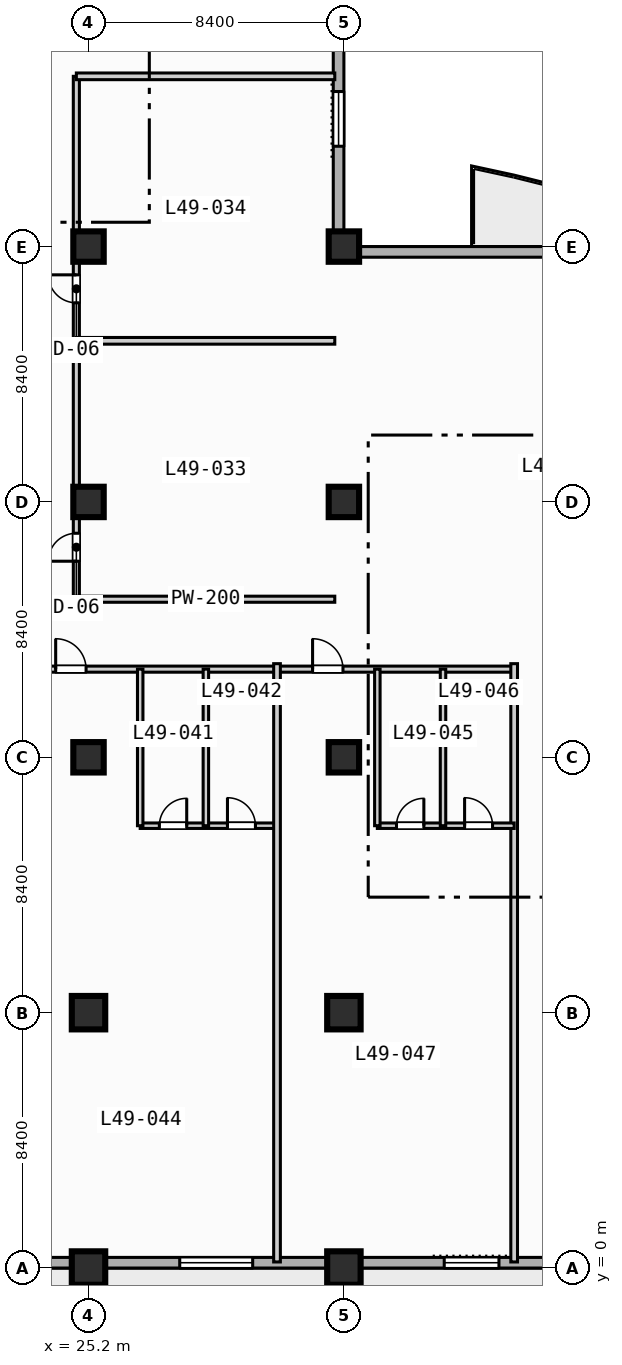
"""IFC4 building model, lengths in metres.
Left out: names, types, materials, properties, quantities, classifications, styles, units other than length and angle.
Written with IfcOpenShell. Run it as: python <this file> out.ifc"""

import sys

from ifc_helpers import new_model, si_unit, direction, frame, frame_2d, origin, origin_2d, place, context, subcontext, project, spatial, rectangle, extrude, element, fill, save


model = new_model("IFC4")
c1 = context("Model", 3, precision=1e-05, world=origin(), true_north=direction((0.0, 1.0)))
c2 = subcontext(c1, "Body", "Model", "MODEL_VIEW")
j1 = project(units=[si_unit("LENGTHUNIT", "METRE"), si_unit("PLANEANGLEUNIT", "RADIAN")], contexts=[c1])
p1 = place(None, origin())
s1 = spatial("IfcSite", under=j1, at=p1, CompositionType="ELEMENT")
p2 = place(p1, origin())
s2 = spatial("IfcBuilding", under=s1, at=p2, CompositionType="ELEMENT")
p3 = place(p2, frame((0.0, 0.0, 201.3)))
s3 = spatial("IfcBuildingStorey", under=s2, at=p3, CompositionType="ELEMENT", Elevation=201.3)
for number, where, z_axis, x_axis in (
    (1, (25.2, 0.0, 0.0), (0.0, 0.0, 1.0), (1.0, 0.0, 0.0)),
    (2, (25.2, 8.4, 0.0), (0.0, 0.0, 1.0), (1.0, 0.0, 0.0)),
):
    element("IfcColumn", number, at=place(p3, frame(where, z_axis=z_axis, x_axis=x_axis)), inside=s3, PredefinedType="COLUMN", context=c2, shape_type="SweptSolid", body=[
        extrude(rectangle(XDim=1.1, YDim=1.1, at=origin_2d()), origin(), (0.0, 0.0, 1.0), 3.7),
    ])
for number, where, z_axis, x_axis in (
    (3, (25.2, 16.8, 0.0), (0.0, 0.0, 1.0), (1.0, 0.0, 0.0)),
    (4, (25.2, 25.2, 0.0), (0.0, 0.0, 1.0), (1.0, 0.0, 0.0)),
    (5, (25.2, 33.6, 0.0), (0.0, 0.0, 1.0), (1.0, 0.0, 0.0)),
):
    element("IfcColumn", number, at=place(p3, frame(where, z_axis=z_axis, x_axis=x_axis)), inside=s3, PredefinedType="COLUMN", context=c2, shape_type="SweptSolid", body=[
        extrude(rectangle(XDim=1.0, YDim=1.0, at=origin_2d()), origin(), (0.0, 0.0, 1.0), 3.7),
    ])
for number, where, z_axis, x_axis in (
    (6, (33.6, 0.0, 0.0), (0.0, 0.0, 1.0), (1.0, 0.0, 0.0)),
    (7, (33.6, 8.4, 0.0), (0.0, 0.0, 1.0), (1.0, 0.0, 0.0)),
):
    element("IfcColumn", number, at=place(p3, frame(where, z_axis=z_axis, x_axis=x_axis)), inside=s3, PredefinedType="COLUMN", context=c2, shape_type="SweptSolid", body=[
        extrude(rectangle(XDim=1.1, YDim=1.1, at=origin_2d()), origin(), (0.0, 0.0, 1.0), 3.7),
    ])
for number, where, z_axis, x_axis in (
    (8, (33.6, 16.8, 0.0), (0.0, 0.0, 1.0), (1.0, 0.0, 0.0)),
    (9, (33.6, 25.2, 0.0), (0.0, 0.0, 1.0), (1.0, 0.0, 0.0)),
    (10, (33.6, 33.6, 0.0), (0.0, 0.0, 1.0), (1.0, 0.0, 0.0)),
):
    element("IfcColumn", number, at=place(p3, frame(where, z_axis=z_axis, x_axis=x_axis)), inside=s3, PredefinedType="COLUMN", context=c2, shape_type="SweptSolid", body=[
        extrude(rectangle(XDim=1.0, YDim=1.0, at=origin_2d()), origin(), (0.0, 0.0, 1.0), 3.7),
    ])
p4 = place(p3, frame((33.425, 72.425, 0.0), z_axis=(0.0, 0.0, 1.0), x_axis=(0.0, -1.0, 0.0)))
e11 = element("IfcWall", 11, at=p4, inside=s3, PredefinedType="STANDARD", context=c2, shape_type="SweptSolid", body=[
    extrude(rectangle(XDim=39.0, YDim=0.35, at=frame_2d((19.5, 0.0))), origin(), (0.0, 0.0, 1.0), 3.47),
])
p5 = place(p4, frame((33.725, 0.0, 0.85)))
e12 = element("IfcOpeningElement", 12, at=p5, cuts=e11, PredefinedType="OPENING", context=c2, shape_type="SweptSolid", body=[
    extrude(rectangle(XDim=1.8, YDim=1.8, at=frame_2d((0.9, 0.9))), frame((0.0, 0.185, 0.0), z_axis=(0.0, -1.0, 0.0), x_axis=(1.0, 0.0, 0.0)), (0.0, 0.0, 1.0), 0.37),
])
p6 = place(p4, frame((16.925, 0.0, 0.85)))
e13 = element("IfcOpeningElement", 13, at=p6, cuts=e11, PredefinedType="OPENING", context=c2, shape_type="SweptSolid", body=[
    extrude(rectangle(XDim=1.8, YDim=1.8, at=frame_2d((0.9, 0.9))), frame((0.0, 0.185, 0.0), z_axis=(0.0, -1.0, 0.0), x_axis=(1.0, 0.0, 0.0)), (0.0, 0.0, 1.0), 0.37),
])
p7 = place(p4, frame((8.225, 0.0, 0.85)))
e14 = element("IfcOpeningElement", 14, at=p7, cuts=e11, PredefinedType="OPENING", context=c2, shape_type="SweptSolid", body=[
    extrude(rectangle(XDim=2.4, YDim=1.95, at=frame_2d((1.2, 0.975))), frame((0.0, 0.185, 0.0), z_axis=(0.0, -1.0, 0.0), x_axis=(1.0, 0.0, 0.0)), (0.0, 0.0, 1.0), 0.37),
])
p8 = place(p3, frame((33.425, 33.425, 0.0), z_axis=(0.0, 0.0, 1.0), x_axis=(1.0, 0.0, 0.0)))
e15 = element("IfcWall", 15, at=p8, inside=s3, PredefinedType="STANDARD", context=c2, shape_type="SweptSolid", body=[
    extrude(rectangle(XDim=39.0, YDim=0.35, at=frame_2d((19.5, 0.0))), origin(), (0.0, 0.0, 1.0), 3.47),
])
p9 = place(p8, frame((12.075, 0.0, 0.0)))
e16 = element("IfcOpeningElement", 16, at=p9, cuts=e15, PredefinedType="OPENING", context=c2, shape_type="SweptSolid", body=[
    extrude(rectangle(XDim=1.4, YDim=2.2, at=frame_2d((0.7, 1.1))), frame((0.0, 0.185, 0.0), z_axis=(0.0, -1.0, 0.0), x_axis=(1.0, 0.0, 0.0)), (0.0, 0.0, 1.0), 0.37),
])
p10 = place(p3, frame((72.425, 0.175, 0.0), z_axis=(0.0, 0.0, 1.0), x_axis=(-1.0, 0.0, 0.0)))
e17 = element("IfcWall", 17, at=p10, inside=s3, PredefinedType="STANDARD", context=c2, shape_type="SweptSolid", body=[
    extrude(rectangle(XDim=69.25, YDim=0.35, at=frame_2d((34.625, 0.0))), origin(), (0.0, 0.0, 1.0), 3.47),
])
p11 = place(p10, frame((52.825, 0.0, 0.0)))
e18 = element("IfcOpeningElement", 18, at=p11, cuts=e17, PredefinedType="OPENING", context=c2, shape_type="SweptSolid", body=[
    extrude(rectangle(XDim=1.4, YDim=2.2, at=frame_2d((0.7, 1.1))), frame((0.0, 0.185, 0.0), z_axis=(0.0, -1.0, 0.0), x_axis=(1.0, 0.0, 0.0)), (0.0, 0.0, 1.0), 0.37),
])
p12 = place(p10, frame((41.825, 0.0, 0.85)))
e19 = element("IfcOpeningElement", 19, at=p12, cuts=e17, PredefinedType="OPENING", context=c2, shape_type="SweptSolid", body=[
    extrude(rectangle(XDim=2.4, YDim=1.95, at=frame_2d((1.2, 0.975))), frame((0.0, 0.185, 0.0), z_axis=(0.0, -1.0, 0.0), x_axis=(1.0, 0.0, 0.0)), (0.0, 0.0, 1.0), 0.37),
])
p13 = place(p10, frame((33.725, 0.0, 0.85)))
e20 = element("IfcOpeningElement", 20, at=p13, cuts=e17, PredefinedType="OPENING", context=c2, shape_type="SweptSolid", body=[
    extrude(rectangle(XDim=1.8, YDim=1.8, at=frame_2d((0.9, 0.9))), frame((0.0, 0.185, 0.0), z_axis=(0.0, -1.0, 0.0), x_axis=(1.0, 0.0, 0.0)), (0.0, 0.0, 1.0), 0.37),
])
p14 = place(p10, frame((25.025, 0.0, 0.85)))
e21 = element("IfcOpeningElement", 21, at=p14, cuts=e17, PredefinedType="OPENING", context=c2, shape_type="SweptSolid", body=[
    extrude(rectangle(XDim=2.4, YDim=1.95, at=frame_2d((1.2, 0.975))), frame((0.0, 0.185, 0.0), z_axis=(0.0, -1.0, 0.0), x_axis=(1.0, 0.0, 0.0)), (0.0, 0.0, 1.0), 0.37),
])
p15 = place(p10, frame((64.675, 0.0, 0.85)))
e22 = element("IfcOpeningElement", 22, at=p15, cuts=e17, PredefinedType="OPENING", context=c2, shape_type="SweptSolid", body=[
    extrude(rectangle(XDim=1.8, YDim=1.8, at=frame_2d((0.9, 0.9))), frame((0.0, 0.185, 0.0), z_axis=(0.0, -1.0, 0.0), x_axis=(1.0, 0.0, 0.0)), (0.0, 0.0, 1.0), 0.37),
])
p16 = place(p10, frame((50.275, 0.0, 0.85)))
e23 = element("IfcOpeningElement", 23, at=p16, cuts=e17, PredefinedType="OPENING", context=c2, shape_type="SweptSolid", body=[
    extrude(rectangle(XDim=1.8, YDim=1.8, at=frame_2d((0.9, 0.9))), frame((0.0, 0.185, 0.0), z_axis=(0.0, -1.0, 0.0), x_axis=(1.0, 0.0, 0.0)), (0.0, 0.0, 1.0), 0.37),
])
p17 = place(p3, frame((24.8, 22.0, 0.0), z_axis=(0.0, 0.0, 1.0), x_axis=(0.0, 1.0, 0.0)))
e24 = element("IfcWall", 24, at=p17, inside=s3, PredefinedType="PARTITIONING", context=c2, shape_type="SweptSolid", body=[
    extrude(rectangle(XDim=17.2, YDim=0.2, at=frame_2d((8.6, 0.0))), origin(), (0.0, 0.0, 1.0), 3.47),
])
p18 = place(p17, frame((1.25, 0.0, 0.0)))
e25 = element("IfcOpeningElement", 25, at=p18, cuts=e24, PredefinedType="OPENING", context=c2, shape_type="SweptSolid", body=[
    extrude(rectangle(XDim=0.92, YDim=2.1, at=frame_2d((0.46, 1.05))), frame((0.0, 0.11, 0.0), z_axis=(0.0, -1.0, 0.0), x_axis=(1.0, 0.0, 0.0)), (0.0, 0.0, 1.0), 0.22),
])
p19 = place(p17, frame((9.75, 0.0, 0.0)))
e26 = element("IfcOpeningElement", 26, at=p19, cuts=e24, PredefinedType="OPENING", context=c2, shape_type="SweptSolid", body=[
    extrude(rectangle(XDim=0.92, YDim=2.1, at=frame_2d((0.46, 1.05))), frame((0.0, 0.11, 0.0), z_axis=(0.0, -1.0, 0.0), x_axis=(1.0, 0.0, 0.0)), (0.0, 0.0, 1.0), 0.22),
])
p20 = place(p3, frame((24.8, 22.0, 0.0), z_axis=(0.0, 0.0, 1.0), x_axis=(1.0, 0.0, 0.0)))
e27 = element("IfcWall", 27, at=p20, inside=s3, PredefinedType="PARTITIONING", context=c2, shape_type="SweptSolid", body=[
    extrude(rectangle(XDim=8.5, YDim=0.2, at=frame_2d((4.25, 0.0))), origin(), (0.0, 0.0, 1.0), 3.47),
])
for number, where, z_axis, x_axis in (
    (28, (24.8, 30.5, 0.0), (0.0, 0.0, 1.0), (1.0, 0.0, 0.0)),
    (29, (24.8, 39.2, 0.0), (0.0, 0.0, 1.0), (1.0, 0.0, 0.0)),
):
    element("IfcWall", number, at=place(p3, frame(where, z_axis=z_axis, x_axis=x_axis)), inside=s3, PredefinedType="PARTITIONING", context=c2, shape_type="SweptSolid", body=[
        extrude(rectangle(XDim=8.5, YDim=0.22, at=frame_2d((4.25, 0.0))), origin(), (0.0, 0.0, 1.0), 3.47),
    ])
p21 = place(p3, frame((3.4, 19.7, 0.0), z_axis=(0.0, 0.0, 1.0), x_axis=(1.0, 0.0, 0.0)))
e30 = element("IfcWall", 30, at=p21, inside=s3, PredefinedType="PARTITIONING", context=c2, shape_type="SweptSolid", body=[
    extrude(rectangle(XDim=35.8, YDim=0.2, at=frame_2d((17.9, 0.0))), origin(), (0.0, 0.0, 1.0), 3.47),
])
p22 = place(p21, frame((1.47, 0.0, 0.0)))
e31 = element("IfcOpeningElement", 31, at=p22, cuts=e30, PredefinedType="OPENING", context=c2, shape_type="SweptSolid", body=[
    extrude(rectangle(XDim=1.0, YDim=2.15, at=frame_2d((0.5, 1.075))), frame((0.0, 0.11, 0.0), z_axis=(0.0, -1.0, 0.0), x_axis=(1.0, 0.0, 0.0)), (0.0, 0.0, 1.0), 0.22),
])
p23 = place(p21, frame((9.87, 0.0, 0.0)))
e32 = element("IfcOpeningElement", 32, at=p23, cuts=e30, PredefinedType="OPENING", context=c2, shape_type="SweptSolid", body=[
    extrude(rectangle(XDim=1.0, YDim=2.15, at=frame_2d((0.5, 1.075))), frame((0.0, 0.11, 0.0), z_axis=(0.0, -1.0, 0.0), x_axis=(1.0, 0.0, 0.0)), (0.0, 0.0, 1.0), 0.22),
])
p24 = place(p21, frame((20.72, 0.0, 0.0)))
e33 = element("IfcOpeningElement", 33, at=p24, cuts=e30, PredefinedType="OPENING", context=c2, shape_type="SweptSolid", body=[
    extrude(rectangle(XDim=1.0, YDim=2.15, at=frame_2d((0.5, 1.075))), frame((0.0, 0.11, 0.0), z_axis=(0.0, -1.0, 0.0), x_axis=(1.0, 0.0, 0.0)), (0.0, 0.0, 1.0), 0.22),
])
p25 = place(p21, frame((29.17, 0.0, 0.0)))
e34 = element("IfcOpeningElement", 34, at=p25, cuts=e30, PredefinedType="OPENING", context=c2, shape_type="SweptSolid", body=[
    extrude(rectangle(XDim=1.0, YDim=2.15, at=frame_2d((0.5, 1.075))), frame((0.0, 0.11, 0.0), z_axis=(0.0, -1.0, 0.0), x_axis=(1.0, 0.0, 0.0)), (0.0, 0.0, 1.0), 0.22),
])
p26 = place(p3, frame((26.9, 14.55, 0.0), z_axis=(0.0, 0.0, 1.0), x_axis=(1.0, 0.0, 0.0)))
e35 = element("IfcWall", 35, at=p26, inside=s3, PredefinedType="PLUMBINGWALL", context=c2, shape_type="SweptSolid", body=[
    extrude(rectangle(XDim=4.5, YDim=0.18, at=frame_2d((2.25, 0.0))), origin(), (0.0, 0.0, 1.0), 3.47),
])
p27 = place(p26, frame((0.63, 0.0, 0.0)))
e36 = element("IfcOpeningElement", 36, at=p27, cuts=e35, PredefinedType="OPENING", context=c2, shape_type="SweptSolid", body=[
    extrude(rectangle(XDim=0.9, YDim=2.1, at=frame_2d((0.45, 1.05))), frame((0.0, 0.1, 0.0), z_axis=(0.0, -1.0, 0.0), x_axis=(1.0, 0.0, 0.0)), (0.0, 0.0, 1.0), 0.2),
])
p28 = place(p26, frame((2.87, 0.0, 0.0)))
e37 = element("IfcOpeningElement", 37, at=p28, cuts=e35, PredefinedType="OPENING", context=c2, shape_type="SweptSolid", body=[
    extrude(rectangle(XDim=0.92, YDim=2.1, at=frame_2d((0.46, 1.05))), frame((0.0, 0.1, 0.0), z_axis=(0.0, -1.0, 0.0), x_axis=(1.0, 0.0, 0.0)), (0.0, 0.0, 1.0), 0.2),
])
for number, where, z_axis, x_axis in (
    (38, (26.9, 14.55, 0.0), (0.0, 0.0, 1.0), (0.0, 1.0, 0.0)),
    (39, (29.06, 14.55, 0.0), (0.0, 0.0, 1.0), (0.0, 1.0, 0.0)),
):
    element("IfcWall", number, at=place(p3, frame(where, z_axis=z_axis, x_axis=x_axis)), inside=s3, PredefinedType="PLUMBINGWALL", context=c2, shape_type="SweptSolid", body=[
        extrude(rectangle(XDim=5.15, YDim=0.18, at=frame_2d((2.575, 0.0))), origin(), (0.0, 0.0, 1.0), 3.47),
    ])
for number, where, z_axis, x_axis in (
    (40, (31.4, 0.2, 0.0), (0.0, 0.0, 1.0), (0.0, 1.0, 0.0)),
    (41, (39.2, 0.2, 0.0), (0.0, 0.0, 1.0), (0.0, 1.0, 0.0)),
):
    element("IfcWall", number, at=place(p3, frame(where, z_axis=z_axis, x_axis=x_axis)), inside=s3, PredefinedType="PARTITIONING", context=c2, shape_type="SweptSolid", body=[
        extrude(rectangle(XDim=19.68, YDim=0.22, at=frame_2d((9.84, 0.0))), origin(), (0.0, 0.0, 1.0), 3.47),
    ])
p29 = place(p3, frame((34.7, 14.55, 0.0), z_axis=(0.0, 0.0, 1.0), x_axis=(1.0, 0.0, 0.0)))
e42 = element("IfcWall", 42, at=p29, inside=s3, PredefinedType="PLUMBINGWALL", context=c2, shape_type="SweptSolid", body=[
    extrude(rectangle(XDim=4.5, YDim=0.18, at=frame_2d((2.25, 0.0))), origin(), (0.0, 0.0, 1.0), 3.47),
])
p30 = place(p29, frame((0.63, 0.0, 0.0)))
e43 = element("IfcOpeningElement", 43, at=p30, cuts=e42, PredefinedType="OPENING", context=c2, shape_type="SweptSolid", body=[
    extrude(rectangle(XDim=0.9, YDim=2.1, at=frame_2d((0.45, 1.05))), frame((0.0, 0.1, 0.0), z_axis=(0.0, -1.0, 0.0), x_axis=(1.0, 0.0, 0.0)), (0.0, 0.0, 1.0), 0.2),
])
p31 = place(p29, frame((2.87, 0.0, 0.0)))
e44 = element("IfcOpeningElement", 44, at=p31, cuts=e42, PredefinedType="OPENING", context=c2, shape_type="SweptSolid", body=[
    extrude(rectangle(XDim=0.92, YDim=2.1, at=frame_2d((0.46, 1.05))), frame((0.0, 0.1, 0.0), z_axis=(0.0, -1.0, 0.0), x_axis=(1.0, 0.0, 0.0)), (0.0, 0.0, 1.0), 0.2),
])
for number, where, z_axis, x_axis in (
    (45, (34.7, 14.55, 0.0), (0.0, 0.0, 1.0), (0.0, 1.0, 0.0)),
    (46, (36.86, 14.55, 0.0), (0.0, 0.0, 1.0), (0.0, 1.0, 0.0)),
):
    element("IfcWall", number, at=place(p3, frame(where, z_axis=z_axis, x_axis=x_axis)), inside=s3, PredefinedType="PLUMBINGWALL", context=c2, shape_type="SweptSolid", body=[
        extrude(rectangle(XDim=5.15, YDim=0.18, at=frame_2d((2.575, 0.0))), origin(), (0.0, 0.0, 1.0), 3.47),
    ])
p32 = place(p5, origin())
e47 = element("IfcWindow", 47, at=p32, inside=s3, PartitioningType="SINGLE_PANEL", PredefinedType="WINDOW", context=c2, shape_type="SweptSolid", body=[
    extrude(rectangle(XDim=1.8, YDim=1.8, at=frame_2d((0.9, 0.9))), frame((0.0, 0.03, 0.0), z_axis=(0.0, -1.0, 0.0), x_axis=(1.0, 0.0, 0.0)), (0.0, 0.0, 1.0), 0.06),
])
fill(e12, e47)
p33 = place(p12, origin())
e48 = element("IfcWindow", 48, at=p33, inside=s3, PartitioningType="SINGLE_PANEL", PredefinedType="WINDOW", context=c2, shape_type="SweptSolid", body=[
    extrude(rectangle(XDim=2.4, YDim=1.95, at=frame_2d((1.2, 0.975))), frame((0.0, 0.03, 0.0), z_axis=(0.0, -1.0, 0.0), x_axis=(1.0, 0.0, 0.0)), (0.0, 0.0, 1.0), 0.06),
])
fill(e19, e48)
p34 = place(p13, origin())
e49 = element("IfcWindow", 49, at=p34, inside=s3, PartitioningType="SINGLE_PANEL", PredefinedType="WINDOW", context=c2, shape_type="SweptSolid", body=[
    extrude(rectangle(XDim=1.8, YDim=1.8, at=frame_2d((0.9, 0.9))), frame((0.0, 0.03, 0.0), z_axis=(0.0, -1.0, 0.0), x_axis=(1.0, 0.0, 0.0)), (0.0, 0.0, 1.0), 0.06),
])
fill(e20, e49)
p35 = place(p18, origin())
e50 = element("IfcDoor", 50, at=p35, inside=s3, OperationType="SINGLE_SWING_LEFT", PredefinedType="DOOR", context=c2, shape_type="SweptSolid", body=[
    extrude(rectangle(XDim=0.92, YDim=2.1, at=frame_2d((0.46, 1.05))), frame((0.0, 0.025, 0.0), z_axis=(0.0, -1.0, 0.0), x_axis=(1.0, 0.0, 0.0)), (0.0, 0.0, 1.0), 0.05),
])
fill(e25, e50)
p36 = place(p19, origin())
e51 = element("IfcDoor", 51, at=p36, inside=s3, OperationType="SINGLE_SWING_RIGHT", PredefinedType="DOOR", context=c2, shape_type="SweptSolid", body=[
    extrude(rectangle(XDim=0.92, YDim=2.1, at=frame_2d((0.46, 1.05))), frame((0.0, 0.025, 0.0), z_axis=(0.0, -1.0, 0.0), x_axis=(1.0, 0.0, 0.0)), (0.0, 0.0, 1.0), 0.05),
])
fill(e26, e51)
p37 = place(p24, origin())
e52 = element("IfcDoor", 52, at=p37, inside=s3, OperationType="SINGLE_SWING_LEFT", PredefinedType="DOOR", context=c2, shape_type="SweptSolid", body=[
    extrude(rectangle(XDim=1.0, YDim=2.15, at=frame_2d((0.5, 1.075))), frame((0.0, 0.025, 0.0), z_axis=(0.0, -1.0, 0.0), x_axis=(1.0, 0.0, 0.0)), (0.0, 0.0, 1.0), 0.05),
])
fill(e33, e52)
p38 = place(p25, origin())
e53 = element("IfcDoor", 53, at=p38, inside=s3, OperationType="SINGLE_SWING_LEFT", PredefinedType="DOOR", context=c2, shape_type="SweptSolid", body=[
    extrude(rectangle(XDim=1.0, YDim=2.15, at=frame_2d((0.5, 1.075))), frame((0.0, 0.025, 0.0), z_axis=(0.0, -1.0, 0.0), x_axis=(1.0, 0.0, 0.0)), (0.0, 0.0, 1.0), 0.05),
])
fill(e34, e53)
p39 = place(p27, origin())
e54 = element("IfcDoor", 54, at=p39, inside=s3, OperationType="SINGLE_SWING_RIGHT", PredefinedType="DOOR", context=c2, shape_type="SweptSolid", body=[
    extrude(rectangle(XDim=0.9, YDim=2.1, at=frame_2d((0.45, 1.05))), frame((0.0, 0.025, 0.0), z_axis=(0.0, -1.0, 0.0), x_axis=(1.0, 0.0, 0.0)), (0.0, 0.0, 1.0), 0.05),
])
fill(e36, e54)
p40 = place(p28, origin())
e55 = element("IfcDoor", 55, at=p40, inside=s3, OperationType="SINGLE_SWING_LEFT", PredefinedType="DOOR", context=c2, shape_type="SweptSolid", body=[
    extrude(rectangle(XDim=0.92, YDim=2.1, at=frame_2d((0.46, 1.05))), frame((0.0, 0.025, 0.0), z_axis=(0.0, -1.0, 0.0), x_axis=(1.0, 0.0, 0.0)), (0.0, 0.0, 1.0), 0.05),
])
fill(e37, e55)
p41 = place(p30, origin())
e56 = element("IfcDoor", 56, at=p41, inside=s3, OperationType="SINGLE_SWING_RIGHT", PredefinedType="DOOR", context=c2, shape_type="SweptSolid", body=[
    extrude(rectangle(XDim=0.9, YDim=2.1, at=frame_2d((0.45, 1.05))), frame((0.0, 0.025, 0.0), z_axis=(0.0, -1.0, 0.0), x_axis=(1.0, 0.0, 0.0)), (0.0, 0.0, 1.0), 0.05),
])
fill(e43, e56)
p42 = place(p31, origin())
e57 = element("IfcDoor", 57, at=p42, inside=s3, OperationType="SINGLE_SWING_LEFT", PredefinedType="DOOR", context=c2, shape_type="SweptSolid", body=[
    extrude(rectangle(XDim=0.92, YDim=2.1, at=frame_2d((0.46, 1.05))), frame((0.0, 0.025, 0.0), z_axis=(0.0, -1.0, 0.0), x_axis=(1.0, 0.0, 0.0)), (0.0, 0.0, 1.0), 0.05),
])
fill(e44, e57)
save(model, sys.argv[1])
